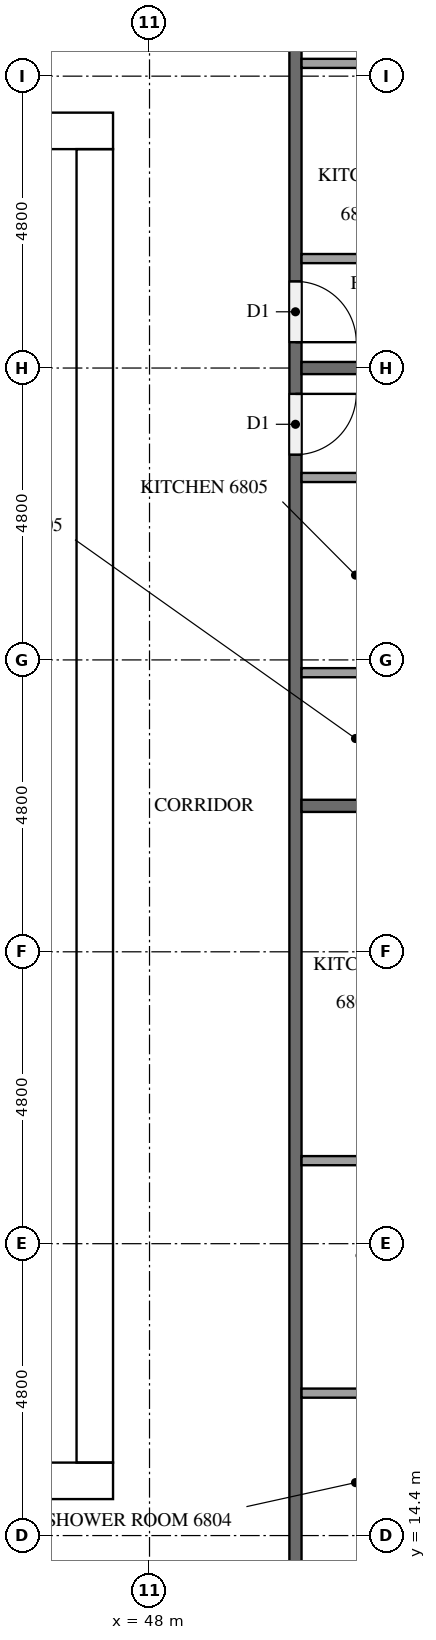
"""IFC4 building model, lengths in metres.
Left out: names, types, materials, properties, quantities, classifications, styles, units other than length and angle.
Written with IfcOpenShell. Run it as: python <this file> out.ifc"""

import sys

from ifc_helpers import new_model, si_unit, direction, frame, frame_2d, origin, place, context, subcontext, project, spatial, rectangle, extrude, element, fill, save


model = new_model("IFC4")
c1 = context("Model", 3, precision=1e-05, world=origin(), true_north=direction((0.0, 1.0)))
c2 = subcontext(c1, "Body", "Model", "MODEL_VIEW")
j1 = project(units=[si_unit("LENGTHUNIT", "METRE"), si_unit("PLANEANGLEUNIT", "RADIAN")], contexts=[c1])
p1 = place(None, origin())
s1 = spatial("IfcSite", under=j1, at=p1, CompositionType="ELEMENT")
p2 = place(p1, origin())
s2 = spatial("IfcBuilding", under=s1, at=p2, CompositionType="ELEMENT")
p3 = place(p2, frame((0.0, 0.0, 259.7)))
s3 = spatial("IfcBuildingStorey", under=s2, at=p3, CompositionType="ELEMENT", Elevation=259.7)
p4 = place(p3, frame((15.0, 15.3, 0.0), z_axis=(0.0, 0.0, 1.0), x_axis=(1.0, 0.0, 0.0)))
e1 = element("IfcWall", 1, at=p4, inside=s3, PredefinedType="SHEAR", context=c2, shape_type="SweptSolid", body=[
    extrude(rectangle(XDim=32.4, YDim=0.6, at=frame_2d((16.2, 0.0))), origin(), (0.0, 0.0, 1.0), 3.1),
])
p5 = place(p4, frame((15.3, 0.0, 0.0)))
e2 = element("IfcOpeningElement", 2, at=p5, cuts=e1, PredefinedType="OPENING", context=c2, shape_type="SweptSolid", body=[
    extrude(rectangle(XDim=1.8, YDim=2.1, at=frame_2d((0.9, 1.05))), frame((0.0, 0.31, 0.0), z_axis=(0.0, -1.0, 0.0), x_axis=(1.0, 0.0, 0.0)), (0.0, 0.0, 1.0), 0.62),
])
p6 = place(p3, frame((15.0, 37.5, 0.0), z_axis=(0.0, 0.0, 1.0), x_axis=(1.0, 0.0, 0.0)))
e3 = element("IfcWall", 3, at=p6, inside=s3, PredefinedType="SHEAR", context=c2, shape_type="SweptSolid", body=[
    extrude(rectangle(XDim=32.4, YDim=0.6, at=frame_2d((16.2, 0.0))), origin(), (0.0, 0.0, 1.0), 3.1),
])
p7 = place(p6, frame((15.3, 0.0, 0.0)))
e4 = element("IfcOpeningElement", 4, at=p7, cuts=e3, PredefinedType="OPENING", context=c2, shape_type="SweptSolid", body=[
    extrude(rectangle(XDim=1.8, YDim=2.1, at=frame_2d((0.9, 1.05))), frame((0.0, 0.31, 0.0), z_axis=(0.0, -1.0, 0.0), x_axis=(1.0, 0.0, 0.0)), (0.0, 0.0, 1.0), 0.62),
])
p8 = place(p6, frame((1.25, 0.0, 0.0)))
e5 = element("IfcOpeningElement", 5, at=p8, cuts=e3, PredefinedType="OPENING", context=c2, shape_type="SweptSolid", body=[
    extrude(rectangle(XDim=1.0, YDim=2.1, at=frame_2d((0.5, 1.05))), frame((0.0, 0.31, 0.0), z_axis=(0.0, -1.0, 0.0), x_axis=(1.0, 0.0, 0.0)), (0.0, 0.0, 1.0), 0.62),
])
p9 = place(p6, frame((4.988, 0.0, 0.0)))
e6 = element("IfcOpeningElement", 6, at=p9, cuts=e3, PredefinedType="OPENING", context=c2, shape_type="SweptSolid", body=[
    extrude(rectangle(XDim=1.0, YDim=2.1, at=frame_2d((0.5, 1.05))), frame((0.0, 0.31, 0.0), z_axis=(0.0, -1.0, 0.0), x_axis=(1.0, 0.0, 0.0)), (0.0, 0.0, 1.0), 0.62),
])
p10 = place(p3, frame((47.1, 15.6, 0.0), z_axis=(0.0, 0.0, 1.0), x_axis=(0.0, 1.0, 0.0)))
e7 = element("IfcWall", 7, at=p10, inside=s3, PredefinedType="SHEAR", context=c2, shape_type="SweptSolid", body=[
    extrude(rectangle(XDim=21.6, YDim=0.6, at=frame_2d((10.8, 0.0))), origin(), (0.0, 0.0, 1.0), 3.1),
])
p11 = place(p10, frame((10.5, 0.0, 0.0)))
e8 = element("IfcOpeningElement", 8, at=p11, cuts=e7, PredefinedType="OPENING", context=c2, shape_type="SweptSolid", body=[
    extrude(rectangle(XDim=1.2, YDim=2.1, at=frame_2d((0.6, 1.05))), frame((0.0, 0.31, 0.0), z_axis=(0.0, -1.0, 0.0), x_axis=(1.0, 0.0, 0.0)), (0.0, 0.0, 1.0), 0.62),
])
p12 = place(p3, frame((50.4, 40.7, 0.0), z_axis=(0.0, 0.0, 1.0), x_axis=(0.0, -1.0, 0.0)))
e9 = element("IfcWall", 9, at=p12, inside=s3, PredefinedType="PARTITIONING", context=c2, shape_type="SweptSolid", body=[
    extrude(rectangle(XDim=28.6, YDim=0.2, at=frame_2d((14.3, 0.0))), origin(), (0.0, 0.0, 1.0), 3.1),
])
p13 = place(p12, frame((27.275, 0.0, 0.0)))
e10 = element("IfcOpeningElement", 10, at=p13, cuts=e9, PredefinedType="OPENING", context=c2, shape_type="SweptSolid", body=[
    extrude(rectangle(XDim=1.0, YDim=2.1, at=frame_2d((0.5, 1.05))), frame((0.0, 0.11, 0.0), z_axis=(0.0, -1.0, 0.0), x_axis=(1.0, 0.0, 0.0)), (0.0, 0.0, 1.0), 0.22),
])
p14 = place(p12, frame((7.525, 0.0, 0.0)))
e11 = element("IfcOpeningElement", 11, at=p14, cuts=e9, PredefinedType="OPENING", context=c2, shape_type="SweptSolid", body=[
    extrude(rectangle(XDim=1.0, YDim=2.1, at=frame_2d((0.5, 1.05))), frame((0.0, 0.11, 0.0), z_axis=(0.0, -1.0, 0.0), x_axis=(1.0, 0.0, 0.0)), (0.0, 0.0, 1.0), 0.22),
])
p15 = place(p12, frame((5.675, 0.0, 0.0)))
e12 = element("IfcOpeningElement", 12, at=p15, cuts=e9, PredefinedType="OPENING", context=c2, shape_type="SweptSolid", body=[
    extrude(rectangle(XDim=1.0, YDim=2.1, at=frame_2d((0.5, 1.05))), frame((0.0, 0.11, 0.0), z_axis=(0.0, -1.0, 0.0), x_axis=(1.0, 0.0, 0.0)), (0.0, 0.0, 1.0), 0.22),
])
for number, where, z_axis, x_axis in (
    (13, (50.5, 26.4, 0.0), (0.0, 0.0, 1.0), (1.0, 0.0, 0.0)),
    (14, (50.5, 33.6, 0.0), (0.0, 0.0, 1.0), (1.0, 0.0, 0.0)),
):
    element("IfcWall", number, at=place(p3, frame(where, z_axis=z_axis, x_axis=x_axis)), inside=s3, PredefinedType="PARTITIONING", context=c2, shape_type="SweptSolid", body=[
        extrude(rectangle(XDim=7.0, YDim=0.2, at=frame_2d((3.5, 0.0))), origin(), (0.0, 0.0, 1.0), 3.1),
    ])
for number, where, z_axis, x_axis in (
    (15, (50.5, 16.742, 0.0), (0.0, 0.0, 1.0), (1.0, 0.0, 0.0)),
    (16, (50.5, 20.565, 0.0), (0.0, 0.0, 1.0), (1.0, 0.0, 0.0)),
    (17, (50.5, 28.59, 0.0), (0.0, 0.0, 1.0), (1.0, 0.0, 0.0)),
):
    element("IfcWall", number, at=place(p3, frame(where, z_axis=z_axis, x_axis=x_axis)), inside=s3, PredefinedType="PARTITIONING", context=c2, shape_type="SweptSolid", body=[
        extrude(rectangle(XDim=1.775, YDim=0.15, at=frame_2d((0.887, 0.0))), origin(), (0.0, 0.0, 1.0), 3.1),
    ])
p16 = place(p3, frame((50.5, 31.8, 0.0), z_axis=(0.0, 0.0, 1.0), x_axis=(1.0, 0.0, 0.0)))
e18 = element("IfcWall", 18, at=p16, inside=s3, PredefinedType="PARTITIONING", context=c2, shape_type="SweptSolid", body=[
    extrude(rectangle(XDim=1.925, YDim=0.15, at=frame_2d((0.962, 0.0))), origin(), (0.0, 0.0, 1.0), 3.1),
])
p17 = place(p3, frame((50.5, 38.61, 0.0), z_axis=(0.0, 0.0, 1.0), x_axis=(1.0, 0.0, 0.0)))
e19 = element("IfcWall", 19, at=p17, inside=s3, PredefinedType="PARTITIONING", context=c2, shape_type="SweptSolid", body=[
    extrude(rectangle(XDim=2.075, YDim=0.15, at=frame_2d((1.038, 0.0))), origin(), (0.0, 0.0, 1.0), 3.1),
])
p18 = place(p3, frame((50.5, 35.4, 0.0), z_axis=(0.0, 0.0, 1.0), x_axis=(1.0, 0.0, 0.0)))
e20 = element("IfcWall", 20, at=p18, inside=s3, PredefinedType="PARTITIONING", context=c2, shape_type="SweptSolid", body=[
    extrude(rectangle(XDim=2.225, YDim=0.15, at=frame_2d((1.113, 0.0))), origin(), (0.0, 0.0, 1.0), 3.1),
])
p19 = place(p11, origin())
e21 = element("IfcDoor", 21, at=p19, inside=s3, OperationType="SINGLE_SWING_RIGHT", PredefinedType="DOOR", context=c2, shape_type="SweptSolid", body=[
    extrude(rectangle(XDim=1.2, YDim=2.1, at=frame_2d((0.6, 1.05))), frame((0.0, 0.025, 0.0), z_axis=(0.0, -1.0, 0.0), x_axis=(1.0, 0.0, 0.0)), (0.0, 0.0, 1.0), 0.05),
])
fill(e8, e21)
p20 = place(p14, origin())
e22 = element("IfcDoor", 22, at=p20, inside=s3, OperationType="SINGLE_SWING_LEFT", PredefinedType="DOOR", context=c2, shape_type="SweptSolid", body=[
    extrude(rectangle(XDim=1.0, YDim=2.1, at=frame_2d((0.5, 1.05))), frame((0.0, 0.025, 0.0), z_axis=(0.0, -1.0, 0.0), x_axis=(1.0, 0.0, 0.0)), (0.0, 0.0, 1.0), 0.05),
])
fill(e11, e22)
p21 = place(p15, origin())
e23 = element("IfcDoor", 23, at=p21, inside=s3, OperationType="SINGLE_SWING_RIGHT", PredefinedType="DOOR", context=c2, shape_type="SweptSolid", body=[
    extrude(rectangle(XDim=1.0, YDim=2.1, at=frame_2d((0.5, 1.05))), frame((0.0, 0.025, 0.0), z_axis=(0.0, -1.0, 0.0), x_axis=(1.0, 0.0, 0.0)), (0.0, 0.0, 1.0), 0.05),
])
fill(e12, e23)
save(model, sys.argv[1])
